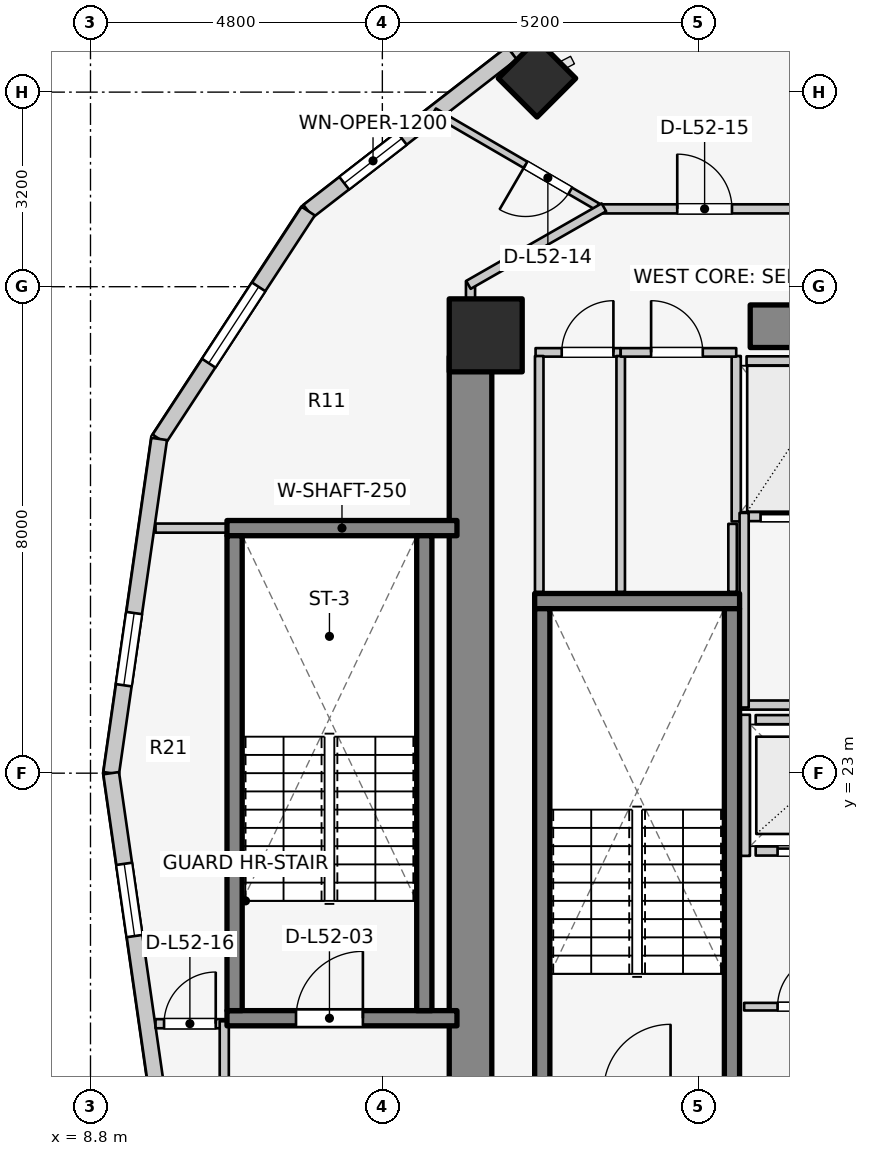
"""IFC4 building model, lengths in metres.
Left out: names, types, materials, properties, quantities, classifications, styles, units other than length and angle.
Written with IfcOpenShell. Run it as: python <this file> out.ifc"""

import sys

from ifc_helpers import new_model, si_unit, direction, frame, frame_2d, origin, origin_2d, place, context, subcontext, project, spatial, rectangle, extrude, element, fill, save


model = new_model("IFC4")
c1 = context("Model", 3, precision=1e-05, world=origin(), true_north=direction((0.0, 1.0)))
c2 = subcontext(c1, "Body", "Model", "MODEL_VIEW")
j1 = project(units=[si_unit("LENGTHUNIT", "METRE"), si_unit("PLANEANGLEUNIT", "RADIAN")], contexts=[c1])
p1 = place(None, origin())
s1 = spatial("IfcSite", under=j1, at=p1, CompositionType="ELEMENT")
p2 = place(p1, origin())
s2 = spatial("IfcBuilding", under=s1, at=p2, CompositionType="ELEMENT")
p3 = place(p2, frame((0.0, 0.0, 171.5)))
s3 = spatial("IfcBuildingStorey", under=s2, at=p3, CompositionType="ELEMENT", Elevation=171.5)
p4 = place(p3, frame((15.05, 17.05, 0.0), z_axis=(0.0, 0.0, 1.0), x_axis=(0.0, 1.0, 0.0)))
e1 = element("IfcWall", 1, at=p4, inside=s3, PredefinedType="SHEAR", context=c2, shape_type="SweptSolid", body=[
    extrude(rectangle(XDim=12.8, YDim=0.7, at=frame_2d((6.4, 0.0))), origin(), (0.0, 0.0, 1.0), 3.1),
])
p5 = place(p3, frame((19.65, 30.35, 0.0), z_axis=(0.0, 0.0, 1.0), x_axis=(1.0, 0.0, 0.0)))
e2 = element("IfcWall", 2, at=p5, inside=s3, PredefinedType="SHEAR", context=c2, shape_type="SweptSolid", body=[
    extrude(rectangle(XDim=4.5, YDim=0.7, at=frame_2d((2.25, 0.0))), origin(), (0.0, 0.0, 1.0), 3.1),
])
p6 = place(p3, frame((16.105, 25.83, 0.0), z_axis=(0.0, 0.0, 1.0), x_axis=(1.0, 0.0, 0.0)))
e3 = element("IfcWall", 3, at=p6, inside=s3, PredefinedType="SOLIDWALL", context=c2, shape_type="SweptSolid", body=[
    extrude(rectangle(XDim=3.37, YDim=0.25, at=frame_2d((1.685, 0.0))), origin(), (0.0, 0.0, 1.0), 3.1),
])
for number, where, z_axis, x_axis in (
    (4, (16.23, 17.895, 0.0), (0.0, 0.0, 1.0), (0.0, 1.0, 0.0)),
    (5, (19.35, 17.895, 0.0), (0.0, 0.0, 1.0), (0.0, 1.0, 0.0)),
):
    element("IfcWall", number, at=place(p3, frame(where, z_axis=z_axis, x_axis=x_axis)), inside=s3, PredefinedType="SOLIDWALL", context=c2, shape_type="SweptSolid", body=[
        extrude(rectangle(XDim=7.81, YDim=0.25, at=frame_2d((3.905, 0.0))), origin(), (0.0, 0.0, 1.0), 3.1),
    ])
p7 = place(p3, frame((11.045, 18.97, 0.0), z_axis=(0.0, 0.0, 1.0), x_axis=(1.0, 0.0, 0.0)))
e6 = element("IfcWall", 6, at=p7, inside=s3, PredefinedType="SOLIDWALL", context=c2, shape_type="SweptSolid", body=[
    extrude(rectangle(XDim=3.782, YDim=0.25, at=frame_2d((1.891, 0.0))), origin(), (0.0, 0.0, 1.0), 3.1),
])
p8 = place(p7, frame((1.135, 0.0, 0.0)))
e7 = element("IfcOpeningElement", 7, at=p8, cuts=e6, PredefinedType="OPENING", context=c2, shape_type="SweptSolid", body=[
    extrude(rectangle(XDim=1.1, YDim=2.1, at=frame_2d((0.55, 1.05))), frame((0.0, 0.135, 0.0), z_axis=(0.0, -1.0, 0.0), x_axis=(1.0, 0.0, 0.0)), (0.0, 0.0, 1.0), 0.27),
])
p9 = place(p3, frame((11.045, 27.03, 0.0), z_axis=(0.0, 0.0, 1.0), x_axis=(1.0, 0.0, 0.0)))
e8 = element("IfcWall", 8, at=p9, inside=s3, PredefinedType="SOLIDWALL", context=c2, shape_type="SweptSolid", body=[
    extrude(rectangle(XDim=3.782, YDim=0.25, at=frame_2d((1.891, 0.0))), origin(), (0.0, 0.0, 1.0), 3.1),
])
for number, where, z_axis, x_axis in (
    (9, (11.17, 19.095, 0.0), (0.0, 0.0, 1.0), (0.0, 1.0, 0.0)),
    (10, (14.29, 19.095, 0.0), (0.0, 0.0, 1.0), (0.0, 1.0, 0.0)),
):
    element("IfcWall", number, at=place(p3, frame(where, z_axis=z_axis, x_axis=x_axis)), inside=s3, PredefinedType="SOLIDWALL", context=c2, shape_type="SweptSolid", body=[
        extrude(rectangle(XDim=7.81, YDim=0.25, at=frame_2d((3.905, 0.0))), origin(), (0.0, 0.0, 1.0), 3.1),
    ])
p10 = place(p3, frame((15.3, 30.2, 0.0), z_axis=(0.0, 0.0, 1.0), x_axis=(1.0, 0.0, 0.0)))
e11 = element("IfcColumn", 11, at=p10, inside=s3, PredefinedType="COLUMN", context=c2, shape_type="SweptSolid", body=[
    extrude(rectangle(XDim=1.2, YDim=1.2, at=origin_2d()), origin(), (0.0, 0.0, 1.0), 3.1),
])
p11 = place(p3, frame((16.143, 34.427, 0.0), z_axis=(0.0, 0.0, 1.0), x_axis=(-0.707106781187, 0.707106781187, 0.0)))
e12 = element("IfcColumn", 12, at=p11, inside=s3, PredefinedType="COLUMN", context=c2, shape_type="SweptSolid", body=[
    extrude(rectangle(XDim=0.9, YDim=0.9, at=origin_2d()), origin(), (0.0, 0.0, 1.0), 3.1),
])
p12 = place(p3, frame((19.587, 36.863, 0.0), z_axis=(0.0, 0.0, 1.0), x_axis=(-0.885660265226, -0.464333818065, 0.0)))
e13 = element("IfcWall", 13, at=p12, inside=s3, PredefinedType="STANDARD", context=c2, shape_type="SweptSolid", body=[
    extrude(rectangle(XDim=4.354, YDim=0.26, at=frame_2d((2.177, 0.0))), origin(), (0.0, 0.0, 1.0), 2.85),
])
p13 = place(p3, frame((15.731, 34.842, 0.0), z_axis=(0.0, 0.0, 1.0), x_axis=(-0.790185650662, -0.612867552973, 0.0)))
e14 = element("IfcWall", 14, at=p13, inside=s3, PredefinedType="STANDARD", context=c2, shape_type="SweptSolid", body=[
    extrude(rectangle(XDim=4.239, YDim=0.26, at=frame_2d((2.12, 0.0))), origin(), (0.0, 0.0, 1.0), 2.85),
])
p14 = place(p13, frame((2.29, 0.0, 0.75)))
e15 = element("IfcOpeningElement", 15, at=p14, cuts=e14, PredefinedType="OPENING", context=c2, shape_type="SweptSolid", body=[
    extrude(rectangle(XDim=1.2, YDim=1.5, at=frame_2d((0.6, 0.75))), frame((0.0, 0.14, 0.0), z_axis=(0.0, -1.0, 0.0), x_axis=(1.0, 0.0, 0.0)), (0.0, 0.0, 1.0), 0.28),
])
p15 = place(p3, frame((12.381, 32.243, 0.0), z_axis=(0.0, 0.0, 1.0), x_axis=(-0.547456494366, -0.836834145322, 0.0)))
e16 = element("IfcWall", 16, at=p15, inside=s3, PredefinedType="STANDARD", context=c2, shape_type="SweptSolid", body=[
    extrude(rectangle(XDim=4.477, YDim=0.26, at=frame_2d((2.239, 0.0))), origin(), (0.0, 0.0, 1.0), 2.85),
])
p16 = place(p15, frame((1.489, 0.0, 0.75)))
e17 = element("IfcOpeningElement", 17, at=p16, cuts=e16, PredefinedType="OPENING", context=c2, shape_type="SweptSolid", body=[
    extrude(rectangle(XDim=1.5, YDim=1.6, at=frame_2d((0.75, 0.8))), frame((0.0, 0.14, 0.0), z_axis=(0.0, -1.0, 0.0), x_axis=(1.0, 0.0, 0.0)), (0.0, 0.0, 1.0), 0.28),
])
p17 = place(p3, frame((9.93, 28.497, 0.0), z_axis=(0.0, 0.0, 1.0), x_axis=(-0.142227632286, -0.989833976288, 0.0)))
e18 = element("IfcWall", 18, at=p17, inside=s3, PredefinedType="STANDARD", context=c2, shape_type="SweptSolid", body=[
    extrude(rectangle(XDim=5.553, YDim=0.26, at=frame_2d((2.776, 0.0))), origin(), (0.0, 0.0, 1.0), 2.85),
])
p18 = place(p17, frame((2.892, 0.0, 0.75)))
e19 = element("IfcOpeningElement", 19, at=p18, cuts=e18, PredefinedType="OPENING", context=c2, shape_type="SweptSolid", body=[
    extrude(rectangle(XDim=1.2, YDim=1.5, at=frame_2d((0.6, 0.75))), frame((0.0, 0.14, 0.0), z_axis=(0.0, -1.0, 0.0), x_axis=(1.0, 0.0, 0.0)), (0.0, 0.0, 1.0), 0.28),
])
p19 = place(p3, frame((9.14, 23.0, 0.0), z_axis=(0.0, 0.0, 1.0), x_axis=(0.142227632286, -0.989833976288, 0.0)))
e20 = element("IfcWall", 20, at=p19, inside=s3, PredefinedType="STANDARD", context=c2, shape_type="SweptSolid", body=[
    extrude(rectangle(XDim=5.553, YDim=0.26, at=frame_2d((2.776, 0.0))), origin(), (0.0, 0.0, 1.0), 2.85),
])
p20 = place(p19, frame((1.506, 0.0, 0.75)))
e21 = element("IfcOpeningElement", 21, at=p20, cuts=e20, PredefinedType="OPENING", context=c2, shape_type="SweptSolid", body=[
    extrude(rectangle(XDim=1.2, YDim=1.5, at=frame_2d((0.6, 0.75))), frame((0.0, 0.14, 0.0), z_axis=(0.0, -1.0, 0.0), x_axis=(1.0, 0.0, 0.0)), (0.0, 0.0, 1.0), 0.28),
])
p21 = place(p3, frame((19.74, 21.72, 0.0), z_axis=(0.0, 0.0, 1.0), x_axis=(1.0, 0.0, 0.0)))
e22 = element("IfcWall", 22, at=p21, inside=s3, PredefinedType="SOLIDWALL", context=c2, shape_type="SweptSolid", body=[
    extrude(rectangle(XDim=1.82, YDim=0.15, at=frame_2d((0.91, 0.0))), origin(), (0.0, 0.0, 1.0), 2.855),
])
p22 = place(p21, frame((0.36, 0.0, 0.0)))
e23 = element("IfcOpeningElement", 23, at=p22, cuts=e22, PredefinedType="OPENING", context=c2, shape_type="SweptSolid", body=[
    extrude(rectangle(XDim=1.1, YDim=2.1, at=frame_2d((0.55, 1.05))), frame((0.0, 0.085, 0.0), z_axis=(0.0, -1.0, 0.0), x_axis=(1.0, 0.0, 0.0)), (0.0, 0.0, 1.0), 0.17),
])
p23 = place(p3, frame((19.74, 23.88, 0.0), z_axis=(0.0, 0.0, 1.0), x_axis=(1.0, 0.0, 0.0)))
e24 = element("IfcWall", 24, at=p23, inside=s3, PredefinedType="SOLIDWALL", context=c2, shape_type="SweptSolid", body=[
    extrude(rectangle(XDim=1.82, YDim=0.15, at=frame_2d((0.91, 0.0))), origin(), (0.0, 0.0, 1.0), 2.855),
])
p24 = place(p3, frame((19.57, 21.64, 0.0), z_axis=(0.0, 0.0, 1.0), x_axis=(0.0, 1.0, 0.0)))
e25 = element("IfcWall", 25, at=p24, inside=s3, PredefinedType="SOLIDWALL", context=c2, shape_type="SweptSolid", body=[
    extrude(rectangle(XDim=2.32, YDim=0.15, at=frame_2d((1.16, 0.0))), origin(), (0.0, 0.0, 1.0), 2.855),
])
p25 = place(p3, frame((19.59, 27.22, 0.0), z_axis=(0.0, 0.0, 1.0), x_axis=(1.0, 0.0, 0.0)))
e26 = element("IfcWall", 26, at=p25, inside=s3, PredefinedType="SOLIDWALL", context=c2, shape_type="SweptSolid", body=[
    extrude(rectangle(XDim=1.76, YDim=0.15, at=frame_2d((0.88, 0.0))), origin(), (0.0, 0.0, 1.0), 2.855),
])
p26 = place(p25, frame((0.23, 0.0, 0.0)))
e27 = element("IfcOpeningElement", 27, at=p26, cuts=e26, PredefinedType="OPENING", context=c2, shape_type="SweptSolid", body=[
    extrude(rectangle(XDim=1.3, YDim=2.1, at=frame_2d((0.65, 1.05))), frame((0.0, 0.085, 0.0), z_axis=(0.0, -1.0, 0.0), x_axis=(1.0, 0.0, 0.0)), (0.0, 0.0, 1.0), 0.17),
])
p27 = place(p3, frame((19.59, 29.78, 0.0), z_axis=(0.0, 0.0, 1.0), x_axis=(1.0, 0.0, 0.0)))
e28 = element("IfcWall", 28, at=p27, inside=s3, PredefinedType="SOLIDWALL", context=c2, shape_type="SweptSolid", body=[
    extrude(rectangle(XDim=1.76, YDim=0.15, at=frame_2d((0.88, 0.0))), origin(), (0.0, 0.0, 1.0), 2.855),
])
p28 = place(p3, frame((19.42, 27.14, 0.0), z_axis=(0.0, 0.0, 1.0), x_axis=(0.0, 1.0, 0.0)))
e29 = element("IfcWall", 29, at=p28, inside=s3, PredefinedType="SOLIDWALL", context=c2, shape_type="SweptSolid", body=[
    extrude(rectangle(XDim=2.72, YDim=0.15, at=frame_2d((1.36, 0.0))), origin(), (0.0, 0.0, 1.0), 2.855),
])
p29 = place(p3, frame((19.52, 24.12, 0.0), z_axis=(0.0, 0.0, 1.0), x_axis=(1.0, 0.0, 0.0)))
e30 = element("IfcWall", 30, at=p29, inside=s3, PredefinedType="PARTITIONING", context=c2, shape_type="SweptSolid", body=[
    extrude(rectangle(XDim=5.08, YDim=0.15, at=frame_2d((2.54, 0.0))), origin(), (0.0, 0.0, 1.0), 2.12),
])
p30 = place(p3, frame((19.55, 24.08, 0.0), z_axis=(0.0, 0.0, 1.0), x_axis=(0.0, 1.0, 0.0)))
e31 = element("IfcWall", 31, at=p30, inside=s3, PredefinedType="PARTITIONING", context=c2, shape_type="SweptSolid", body=[
    extrude(rectangle(XDim=3.2, YDim=0.15, at=frame_2d((1.6, 0.0))), origin(), (0.0, 0.0, 1.0), 2.855),
])
p31 = place(p3, frame((19.55, 19.16, 0.0), z_axis=(0.0, 0.0, 1.0), x_axis=(1.0, 0.0, 0.0)))
e32 = element("IfcWall", 32, at=p31, inside=s3, PredefinedType="PARTITIONING", context=c2, shape_type="SweptSolid", body=[
    extrude(rectangle(XDim=4.87, YDim=0.125, at=frame_2d((2.435, 0.0))), origin(), (0.0, 0.0, 1.0), 2.12),
])
p32 = place(p31, frame((0.55, 0.0, 0.0)))
e33 = element("IfcOpeningElement", 33, at=p32, cuts=e32, PredefinedType="OPENING", context=c2, shape_type="SweptSolid", body=[
    extrude(rectangle(XDim=0.85, YDim=2.05, at=frame_2d((0.425, 1.025))), frame((0.0, 0.073, 0.0), z_axis=(0.0, -1.0, 0.0), x_axis=(1.0, 0.0, 0.0)), (0.0, 0.0, 1.0), 0.145),
])
p33 = place(p3, frame((16.12, 29.92, 0.0), z_axis=(0.0, 0.0, 1.0), x_axis=(1.0, 0.0, 0.0)))
e34 = element("IfcWall", 34, at=p33, inside=s3, PredefinedType="PLUMBINGWALL", context=c2, shape_type="SweptSolid", body=[
    extrude(rectangle(XDim=1.4, YDim=0.14, at=frame_2d((0.7, 0.0))), origin(), (0.0, 0.0, 1.0), 2.855),
])
p34 = place(p33, frame((0.43, 0.0, 0.0)))
e35 = element("IfcOpeningElement", 35, at=p34, cuts=e34, PredefinedType="OPENING", context=c2, shape_type="SweptSolid", body=[
    extrude(rectangle(XDim=0.85, YDim=2.05, at=frame_2d((0.425, 1.025))), frame((0.0, 0.08, 0.0), z_axis=(0.0, -1.0, 0.0), x_axis=(1.0, 0.0, 0.0)), (0.0, 0.0, 1.0), 0.16),
])
for number, where, z_axis, x_axis in (
    (36, (16.18, 25.98, 0.0), (0.0, 0.0, 1.0), (0.0, 1.0, 0.0)),
    (37, (17.52, 25.98, 0.0), (0.0, 0.0, 1.0), (0.0, 1.0, 0.0)),
):
    element("IfcWall", number, at=place(p3, frame(where, z_axis=z_axis, x_axis=x_axis)), inside=s3, PredefinedType="PLUMBINGWALL", context=c2, shape_type="SweptSolid", body=[
        extrude(rectangle(XDim=3.88, YDim=0.14, at=frame_2d((1.94, 0.0))), origin(), (0.0, 0.0, 1.0), 2.855),
    ])
p35 = place(p3, frame((17.52, 29.92, 0.0), z_axis=(0.0, 0.0, 1.0), x_axis=(1.0, 0.0, 0.0)))
e38 = element("IfcWall", 38, at=p35, inside=s3, PredefinedType="PLUMBINGWALL", context=c2, shape_type="SweptSolid", body=[
    extrude(rectangle(XDim=1.9, YDim=0.14, at=frame_2d((0.95, 0.0))), origin(), (0.0, 0.0, 1.0), 2.855),
])
p36 = place(p35, frame((0.5, 0.0, 0.0)))
e39 = element("IfcOpeningElement", 39, at=p36, cuts=e38, PredefinedType="OPENING", context=c2, shape_type="SweptSolid", body=[
    extrude(rectangle(XDim=0.85, YDim=2.05, at=frame_2d((0.425, 1.025))), frame((0.0, 0.08, 0.0), z_axis=(0.0, -1.0, 0.0), x_axis=(1.0, 0.0, 0.0)), (0.0, 0.0, 1.0), 0.16),
])
p37 = place(p3, frame((19.36, 25.98, 0.0), z_axis=(0.0, 0.0, 1.0), x_axis=(0.0, 1.0, 0.0)))
e40 = element("IfcWall", 40, at=p37, inside=s3, PredefinedType="PLUMBINGWALL", context=c2, shape_type="SweptSolid", body=[
    extrude(rectangle(XDim=1.12, YDim=0.14, at=frame_2d((0.56, 0.0))), origin(), (0.0, 0.0, 1.0), 2.855),
])
p38 = place(p3, frame((9.87, 27.03, 0.0), z_axis=(0.0, 0.0, 1.0), x_axis=(1.0, 0.0, 0.0)))
e41 = element("IfcWall", 41, at=p38, inside=s3, PredefinedType="PARTITIONING", context=c2, shape_type="SweptSolid", body=[
    extrude(rectangle(XDim=1.17, YDim=0.15, at=frame_2d((0.585, 0.0))), origin(), (0.0, 0.0, 1.0), 2.855),
])
p39 = place(p3, frame((15.05, 29.8, 0.0), z_axis=(0.0, 0.0, 1.0), x_axis=(0.0, 1.0, 0.0)))
e42 = element("IfcWall", 42, at=p39, inside=s3, PredefinedType="PARTITIONING", context=c2, shape_type="SweptSolid", body=[
    extrude(rectangle(XDim=1.29, YDim=0.15, at=frame_2d((0.645, 0.0))), origin(), (0.0, 0.0, 1.0), 2.855),
])
p40 = place(p3, frame((17.243, 32.255, 0.0), z_axis=(0.0, 0.0, 1.0), x_axis=(-0.864408655832, 0.502789892224, 0.0)))
e43 = element("IfcWall", 43, at=p40, inside=s3, PredefinedType="MOVABLE", context=c2, shape_type="SweptSolid", body=[
    extrude(rectangle(XDim=3.23, YDim=0.12, at=frame_2d((1.615, 0.0))), origin(), (0.0, 0.0, 1.0), 2.22),
])
p41 = place(p40, frame((0.641, 0.0, 0.0)))
e44 = element("IfcOpeningElement", 44, at=p41, cuts=e43, PredefinedType="OPENING", context=c2, shape_type="SweptSolid", body=[
    extrude(rectangle(XDim=0.85, YDim=2.05, at=frame_2d((0.425, 1.025))), frame((0.0, 0.07, 0.0), z_axis=(0.0, -1.0, 0.0), x_axis=(1.0, 0.0, 0.0)), (0.0, 0.0, 1.0), 0.14),
])
p42 = place(p3, frame((17.15, 32.28, 0.0), z_axis=(0.0, 0.0, 1.0), x_axis=(1.0, 0.0, 0.0)))
e45 = element("IfcWall", 45, at=p42, inside=s3, PredefinedType="PARTITIONING", context=c2, shape_type="SweptSolid", body=[
    extrude(rectangle(XDim=7.52, YDim=0.15, at=frame_2d((3.76, 0.0))), origin(), (0.0, 0.0, 1.0), 2.299),
])
p43 = place(p42, frame((1.3, 0.0, 0.0)))
e46 = element("IfcOpeningElement", 46, at=p43, cuts=e45, PredefinedType="OPENING", context=c2, shape_type="SweptSolid", body=[
    extrude(rectangle(XDim=0.9, YDim=2.1, at=frame_2d((0.45, 1.05))), frame((0.0, 0.085, 0.0), z_axis=(0.0, -1.0, 0.0), x_axis=(1.0, 0.0, 0.0)), (0.0, 0.0, 1.0), 0.17),
])
p44 = place(p3, frame((17.243, 32.305, 0.0), z_axis=(0.0, 0.0, 1.0), x_axis=(-0.867991349648, -0.496579315857, 0.0)))
e47 = element("IfcWall", 47, at=p44, inside=s3, PredefinedType="PARTITIONING", context=c2, shape_type="SweptSolid", body=[
    extrude(rectangle(XDim=2.567, YDim=0.15, at=frame_2d((1.283, 0.0))), origin(), (0.0, 0.0, 1.0), 2.22),
])
p45 = place(p3, frame((9.87, 18.88, 0.0), z_axis=(0.0, 0.0, 1.0), x_axis=(1.0, 0.0, 0.0)))
e48 = element("IfcWall", 48, at=p45, inside=s3, PredefinedType="PARTITIONING", context=c2, shape_type="SweptSolid", body=[
    extrude(rectangle(XDim=1.17, YDim=0.15, at=frame_2d((0.585, 0.0))), origin(), (0.0, 0.0, 1.0), 2.855),
])
p46 = place(p45, frame((0.14, 0.0, 0.0)))
e49 = element("IfcOpeningElement", 49, at=p46, cuts=e48, PredefinedType="OPENING", context=c2, shape_type="SweptSolid", body=[
    extrude(rectangle(XDim=0.85, YDim=2.05, at=frame_2d((0.425, 1.025))), frame((0.0, 0.085, 0.0), z_axis=(0.0, -1.0, 0.0), x_axis=(1.0, 0.0, 0.0)), (0.0, 0.0, 1.0), 0.17),
])
p47 = place(p3, frame((11.0, 15.91, 0.0), z_axis=(0.0, 0.0, 1.0), x_axis=(0.0, 1.0, 0.0)))
e50 = element("IfcWall", 50, at=p47, inside=s3, PredefinedType="PARTITIONING", context=c2, shape_type="SweptSolid", body=[
    extrude(rectangle(XDim=3.01, YDim=0.15, at=frame_2d((1.505, 0.0))), origin(), (0.0, 0.0, 1.0), 2.855),
])
p48 = place(p3, frame((26.12, 33.806, 0.0), z_axis=(0.0, 0.0, 1.0), x_axis=(-0.939901628116, 0.341445353557, 0.0)))
e51 = element("IfcWall", 51, at=p48, inside=s3, PredefinedType="PARTITIONING", context=c2, shape_type="SweptSolid", body=[
    extrude(rectangle(XDim=6.387, YDim=0.125, at=frame_2d((3.194, 0.0))), origin(), (0.0, 0.0, 1.0), 2.299),
])
p49 = place(p14, origin())
e52 = element("IfcWindow", 52, at=p49, inside=s3, PartitioningType="SINGLE_PANEL", PredefinedType="WINDOW", context=c2, shape_type="SweptSolid", body=[
    extrude(rectangle(XDim=1.2, YDim=1.5, at=frame_2d((0.6, 0.75))), frame((0.0, 0.03, 0.0), z_axis=(0.0, -1.0, 0.0), x_axis=(1.0, 0.0, 0.0)), (0.0, 0.0, 1.0), 0.06),
])
fill(e15, e52)
p50 = place(p16, origin())
e53 = element("IfcWindow", 53, at=p50, inside=s3, PartitioningType="SINGLE_PANEL", PredefinedType="WINDOW", context=c2, shape_type="SweptSolid", body=[
    extrude(rectangle(XDim=1.5, YDim=1.6, at=frame_2d((0.75, 0.8))), frame((0.0, 0.03, 0.0), z_axis=(0.0, -1.0, 0.0), x_axis=(1.0, 0.0, 0.0)), (0.0, 0.0, 1.0), 0.06),
])
fill(e17, e53)
p51 = place(p18, origin())
e54 = element("IfcWindow", 54, at=p51, inside=s3, PartitioningType="SINGLE_PANEL", PredefinedType="WINDOW", context=c2, shape_type="SweptSolid", body=[
    extrude(rectangle(XDim=1.2, YDim=1.5, at=frame_2d((0.6, 0.75))), frame((0.0, 0.03, 0.0), z_axis=(0.0, -1.0, 0.0), x_axis=(1.0, 0.0, 0.0)), (0.0, 0.0, 1.0), 0.06),
])
fill(e19, e54)
p52 = place(p20, origin())
e55 = element("IfcWindow", 55, at=p52, inside=s3, PartitioningType="SINGLE_PANEL", PredefinedType="WINDOW", context=c2, shape_type="SweptSolid", body=[
    extrude(rectangle(XDim=1.2, YDim=1.5, at=frame_2d((0.6, 0.75))), frame((0.0, 0.03, 0.0), z_axis=(0.0, -1.0, 0.0), x_axis=(1.0, 0.0, 0.0)), (0.0, 0.0, 1.0), 0.06),
])
fill(e21, e55)
p53 = place(p8, origin())
e56 = element("IfcDoor", 56, at=p53, inside=s3, OperationType="SINGLE_SWING_RIGHT", PredefinedType="DOOR", context=c2, shape_type="SweptSolid", body=[
    extrude(rectangle(XDim=1.1, YDim=2.1, at=frame_2d((0.55, 1.05))), frame((0.0, 0.025, 0.0), z_axis=(0.0, -1.0, 0.0), x_axis=(1.0, 0.0, 0.0)), (0.0, 0.0, 1.0), 0.05),
])
fill(e7, e56)
p54 = place(p22, origin())
e57 = element("IfcDoor", 57, at=p54, inside=s3, OperationType="DOUBLE_DOOR_SLIDING", PredefinedType="DOOR", context=c2, shape_type="SweptSolid", body=[
    extrude(rectangle(XDim=1.1, YDim=2.1, at=frame_2d((0.55, 1.05))), frame((0.0, 0.025, 0.0), z_axis=(0.0, -1.0, 0.0), x_axis=(1.0, 0.0, 0.0)), (0.0, 0.0, 1.0), 0.05),
])
fill(e23, e57)
p55 = place(p26, origin())
e58 = element("IfcDoor", 58, at=p55, inside=s3, OperationType="DOUBLE_DOOR_SLIDING", PredefinedType="DOOR", context=c2, shape_type="SweptSolid", body=[
    extrude(rectangle(XDim=1.3, YDim=2.1, at=frame_2d((0.65, 1.05))), frame((0.0, 0.025, 0.0), z_axis=(0.0, -1.0, 0.0), x_axis=(1.0, 0.0, 0.0)), (0.0, 0.0, 1.0), 0.05),
])
fill(e27, e58)
p56 = place(p32, origin())
e59 = element("IfcDoor", 59, at=p56, inside=s3, OperationType="SINGLE_SWING_RIGHT", PredefinedType="DOOR", context=c2, shape_type="SweptSolid", body=[
    extrude(rectangle(XDim=0.85, YDim=2.05, at=frame_2d((0.425, 1.025))), frame((0.0, 0.025, 0.0), z_axis=(0.0, -1.0, 0.0), x_axis=(1.0, 0.0, 0.0)), (0.0, 0.0, 1.0), 0.05),
])
fill(e33, e59)
p57 = place(p34, origin())
e60 = element("IfcDoor", 60, at=p57, inside=s3, OperationType="SINGLE_SWING_RIGHT", PredefinedType="DOOR", context=c2, shape_type="SweptSolid", body=[
    extrude(rectangle(XDim=0.85, YDim=2.05, at=frame_2d((0.425, 1.025))), frame((0.0, 0.025, 0.0), z_axis=(0.0, -1.0, 0.0), x_axis=(1.0, 0.0, 0.0)), (0.0, 0.0, 1.0), 0.05),
])
fill(e35, e60)
p58 = place(p36, origin())
e61 = element("IfcDoor", 61, at=p58, inside=s3, OperationType="SINGLE_SWING_LEFT", PredefinedType="DOOR", context=c2, shape_type="SweptSolid", body=[
    extrude(rectangle(XDim=0.85, YDim=2.05, at=frame_2d((0.425, 1.025))), frame((0.0, 0.025, 0.0), z_axis=(0.0, -1.0, 0.0), x_axis=(1.0, 0.0, 0.0)), (0.0, 0.0, 1.0), 0.05),
])
fill(e39, e61)
p59 = place(p41, origin())
e62 = element("IfcDoor", 62, at=p59, inside=s3, OperationType="SINGLE_SWING_RIGHT", PredefinedType="DOOR", context=c2, shape_type="SweptSolid", body=[
    extrude(rectangle(XDim=0.85, YDim=2.05, at=frame_2d((0.425, 1.025))), frame((0.0, 0.025, 0.0), z_axis=(0.0, -1.0, 0.0), x_axis=(1.0, 0.0, 0.0)), (0.0, 0.0, 1.0), 0.05),
])
fill(e44, e62)
p60 = place(p43, origin())
e63 = element("IfcDoor", 63, at=p60, inside=s3, OperationType="SINGLE_SWING_LEFT", PredefinedType="DOOR", context=c2, shape_type="SweptSolid", body=[
    extrude(rectangle(XDim=0.9, YDim=2.1, at=frame_2d((0.45, 1.05))), frame((0.0, 0.025, 0.0), z_axis=(0.0, -1.0, 0.0), x_axis=(1.0, 0.0, 0.0)), (0.0, 0.0, 1.0), 0.05),
])
fill(e46, e63)
p61 = place(p46, origin())
e64 = element("IfcDoor", 64, at=p61, inside=s3, OperationType="SINGLE_SWING_RIGHT", PredefinedType="DOOR", context=c2, shape_type="SweptSolid", body=[
    extrude(rectangle(XDim=0.85, YDim=2.05, at=frame_2d((0.425, 1.025))), frame((0.0, 0.025, 0.0), z_axis=(0.0, -1.0, 0.0), x_axis=(1.0, 0.0, 0.0)), (0.0, 0.0, 1.0), 0.05),
])
fill(e49, e64)
save(model, sys.argv[1])
